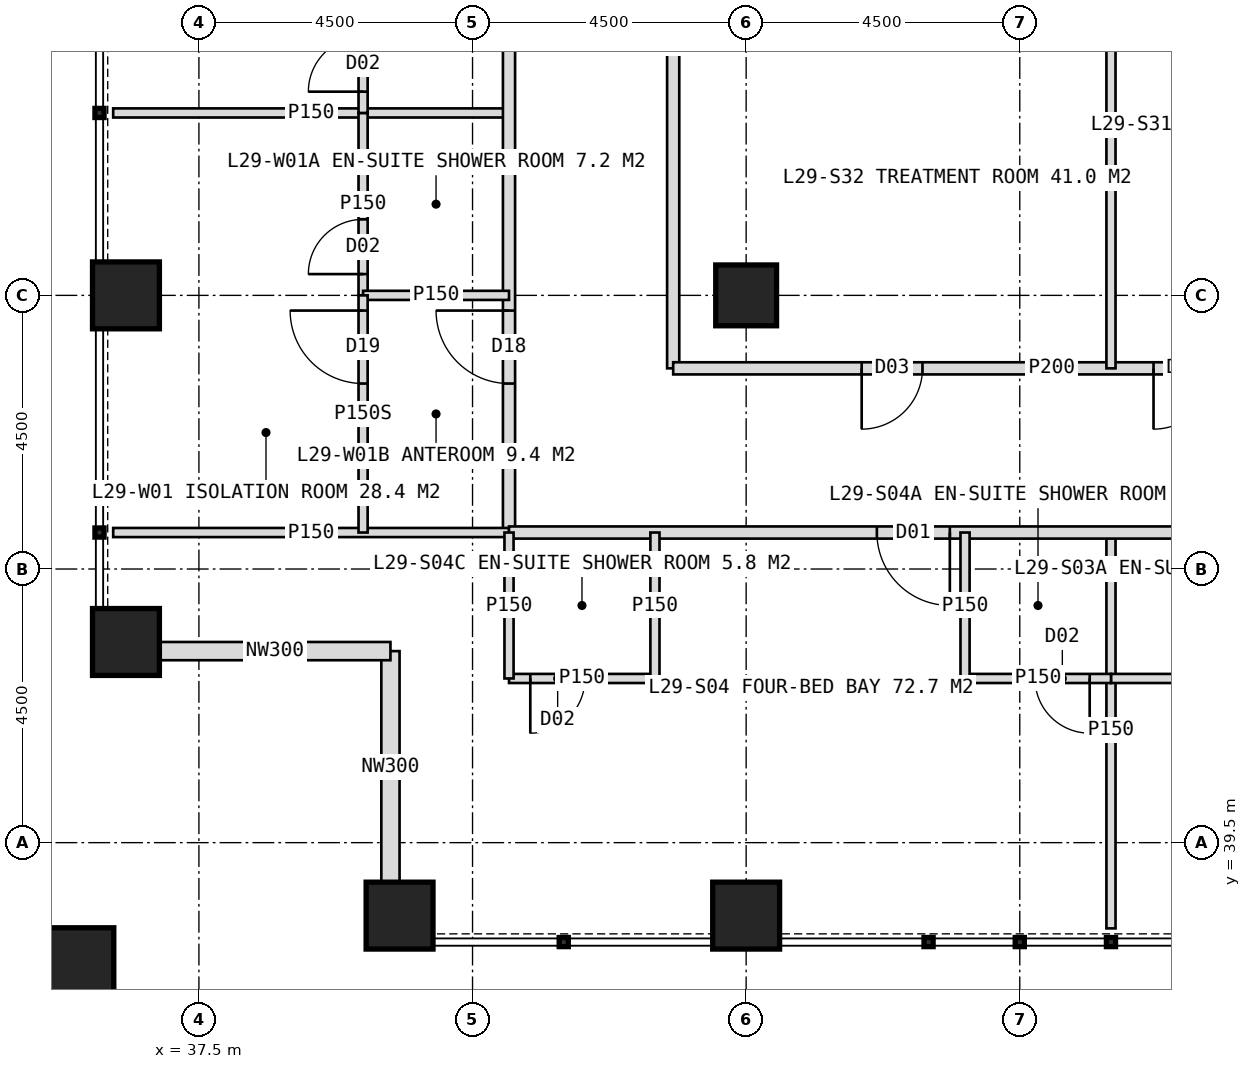
"""IFC4 building model, lengths in metres.
Left out: names, types, materials, properties, quantities, classifications, styles, units other than length and angle.
Written with IfcOpenShell. Run it as: python <this file> out.ifc"""

import sys

from ifc_helpers import new_model, si_unit, direction, frame, frame_2d, origin, origin_2d, place, context, subcontext, project, spatial, rectangle, hollow_rectangle, extrude, element, fill, save


model = new_model("IFC4")
c1 = context("Model", 3, precision=1e-05, world=origin(), true_north=direction((0.0, 1.0)))
c2 = subcontext(c1, "Body", "Model", "MODEL_VIEW")
j1 = project(units=[si_unit("LENGTHUNIT", "METRE"), si_unit("PLANEANGLEUNIT", "RADIAN")], contexts=[c1])
p1 = place(None, origin())
s1 = spatial("IfcSite", under=j1, at=p1, CompositionType="ELEMENT")
p2 = place(p1, origin())
s2 = spatial("IfcBuilding", under=s1, at=p2, CompositionType="ELEMENT")
p3 = place(p2, frame((0.0, 0.0, 124.0)))
s3 = spatial("IfcBuildingStorey", under=s2, at=p3, CompositionType="ELEMENT", Elevation=124.0)
p4 = place(p3, frame((46.5, 48.5, 0.0), z_axis=(0.0, 0.0, 1.0), x_axis=(1.0, 0.0, 0.0)))
e1 = element("IfcColumn", 1, at=p4, inside=s3, PredefinedType="COLUMN", context=c2, shape_type="SweptSolid", body=[
    extrude(hollow_rectangle(XDim=1.0, YDim=1.0, WallThickness=0.1, at=origin_2d()), origin(), (0.0, 0.0, 1.0), 4.0),
])
for number, where, z_axis, x_axis in (
    (2, (40.8, 38.3, 0.0), (0.0, 0.0, 1.0), (1.0, 0.0, 0.0)),
    (3, (36.3, 42.8, 0.0), (0.0, 0.0, 1.0), (1.0, 0.0, 0.0)),
    (4, (46.5, 38.3, 0.0), (0.0, 0.0, 1.0), (1.0, 0.0, 0.0)),
    (5, (36.3, 48.5, 0.0), (0.0, 0.0, 1.0), (1.0, 0.0, 0.0)),
):
    element("IfcColumn", number, at=place(p3, frame(where, z_axis=z_axis, x_axis=x_axis)), inside=s3, PredefinedType="COLUMN", context=c2, shape_type="SweptSolid", body=[
        extrude(hollow_rectangle(XDim=1.1, YDim=1.1, WallThickness=0.1, at=origin_2d()), origin(), (0.0, 0.0, 1.0), 4.0),
    ])
p5 = place(p3, frame((35.4, 37.4, 0.0), z_axis=(0.0, 0.0, 1.0), x_axis=(1.0, 0.0, 0.0)))
e6 = element("IfcColumn", 6, at=p5, inside=s3, PredefinedType="COLUMN", context=c2, shape_type="SweptSolid", body=[
    extrude(hollow_rectangle(XDim=1.4, YDim=1.4, WallThickness=0.08, at=origin_2d()), origin(), (0.0, 0.0, 1.0), 4.0),
])
for number, where, z_axis, x_axis in (
    (7, (40.65, 38.85, 0.0), (0.0, 0.0, 1.0), (0.0, 1.0, 0.0)),
    (8, (40.65, 42.65, 0.0), (0.0, 0.0, 1.0), (-1.0, 0.0, 0.0)),
):
    element("IfcWall", number, at=place(p3, frame(where, z_axis=z_axis, x_axis=x_axis)), inside=s3, PredefinedType="ELEMENTEDWALL", context=c2, shape_type="SweptSolid", body=[
        extrude(rectangle(XDim=3.8, YDim=0.3, at=frame_2d((1.9, 0.0))), origin(), (0.0, 0.0, 1.0), 4.0),
    ])
p6 = place(p3, frame((42.6, 51.5, 0.0), z_axis=(0.0, 0.0, 1.0), x_axis=(-1.0, 0.0, 0.0)))
e9 = element("IfcWall", 9, at=p6, inside=s3, PredefinedType="PARTITIONING", context=c2, shape_type="SweptSolid", body=[
    extrude(rectangle(XDim=6.51, YDim=0.15, at=frame_2d((3.255, 0.0))), origin(), (0.0, 0.0, 1.0), 3.75),
])
p7 = place(p3, frame((42.6, 44.6, 0.0), z_axis=(0.0, 0.0, 1.0), x_axis=(0.0, 1.0, 0.0)))
e10 = element("IfcWall", 10, at=p7, inside=s3, PredefinedType="PARTITIONING", context=c2, shape_type="SweptSolid", body=[
    extrude(rectangle(XDim=34.8, YDim=0.2, at=frame_2d((17.4, 0.0))), origin(), (0.0, 0.0, 1.0), 3.75),
])
p8 = place(p7, frame((2.45, 0.0, 0.0)))
e11 = element("IfcOpeningElement", 11, at=p8, cuts=e10, PredefinedType="OPENING", context=c2, shape_type="SweptSolid", body=[
    extrude(rectangle(XDim=1.2, YDim=2.2, at=frame_2d((0.6, 1.1))), frame((0.0, 0.11, 0.0), z_axis=(0.0, -1.0, 0.0), x_axis=(1.0, 0.0, 0.0)), (0.0, 0.0, 1.0), 0.22),
])
p9 = place(p7, frame((10.15, 0.0, 0.0)))
e12 = element("IfcOpeningElement", 12, at=p9, cuts=e10, PredefinedType="OPENING", context=c2, shape_type="SweptSolid", body=[
    extrude(rectangle(XDim=1.2, YDim=2.2, at=frame_2d((0.6, 1.1))), frame((0.0, 0.11, 0.0), z_axis=(0.0, -1.0, 0.0), x_axis=(1.0, 0.0, 0.0)), (0.0, 0.0, 1.0), 0.22),
])
p10 = place(p7, frame((23.45, 0.0, 0.0)))
e13 = element("IfcOpeningElement", 13, at=p10, cuts=e10, PredefinedType="OPENING", context=c2, shape_type="SweptSolid", body=[
    extrude(rectangle(XDim=1.2, YDim=2.2, at=frame_2d((0.6, 1.1))), frame((0.0, 0.11, 0.0), z_axis=(0.0, -1.0, 0.0), x_axis=(1.0, 0.0, 0.0)), (0.0, 0.0, 1.0), 0.22),
])
p11 = place(p7, frame((30.55, 0.0, 0.0)))
e14 = element("IfcOpeningElement", 14, at=p11, cuts=e10, PredefinedType="OPENING", context=c2, shape_type="SweptSolid", body=[
    extrude(rectangle(XDim=1.2, YDim=2.2, at=frame_2d((0.6, 1.1))), frame((0.0, 0.11, 0.0), z_axis=(0.0, -1.0, 0.0), x_axis=(1.0, 0.0, 0.0)), (0.0, 0.0, 1.0), 0.22),
])
p12 = place(p3, frame((42.6, 44.6, 0.0), z_axis=(0.0, 0.0, 1.0), x_axis=(-1.0, 0.0, 0.0)))
e15 = element("IfcWall", 15, at=p12, inside=s3, PredefinedType="PARTITIONING", context=c2, shape_type="SweptSolid", body=[
    extrude(rectangle(XDim=6.51, YDim=0.15, at=frame_2d((3.255, 0.0))), origin(), (0.0, 0.0, 1.0), 3.75),
])
p13 = place(p3, frame((40.2, 48.5, 0.0), z_axis=(0.0, 0.0, 1.0), x_axis=(0.0, 1.0, 0.0)))
e16 = element("IfcWall", 16, at=p13, inside=s3, PredefinedType="PARTITIONING", context=c2, shape_type="SweptSolid", body=[
    extrude(rectangle(XDim=3.0, YDim=0.15, at=frame_2d((1.5, 0.0))), origin(), (0.0, 0.0, 1.0), 3.75),
])
p14 = place(p13, frame((0.35, 0.0, 0.0)))
e17 = element("IfcOpeningElement", 17, at=p14, cuts=e16, PredefinedType="OPENING", context=c2, shape_type="SweptSolid", body=[
    extrude(rectangle(XDim=0.9, YDim=2.1, at=frame_2d((0.45, 1.05))), frame((0.0, 0.085, 0.0), z_axis=(0.0, -1.0, 0.0), x_axis=(1.0, 0.0, 0.0)), (0.0, 0.0, 1.0), 0.17),
])
p15 = place(p3, frame((42.6, 48.5, 0.0), z_axis=(0.0, 0.0, 1.0), x_axis=(-1.0, 0.0, 0.0)))
e18 = element("IfcWall", 18, at=p15, inside=s3, PredefinedType="PARTITIONING", context=c2, shape_type="SweptSolid", body=[
    extrude(rectangle(XDim=2.4, YDim=0.15, at=frame_2d((1.2, 0.0))), origin(), (0.0, 0.0, 1.0), 2.95),
])
p16 = place(p3, frame((40.2, 44.6, 0.0), z_axis=(0.0, 0.0, 1.0), x_axis=(0.0, 1.0, 0.0)))
e19 = element("IfcWall", 19, at=p16, inside=s3, PredefinedType="PARTITIONING", context=c2, shape_type="SweptSolid", body=[
    extrude(rectangle(XDim=3.9, YDim=0.15, at=frame_2d((1.95, 0.0))), origin(), (0.0, 0.0, 1.0), 3.75),
])
p17 = place(p16, frame((2.45, 0.0, 0.0)))
e20 = element("IfcOpeningElement", 20, at=p17, cuts=e19, PredefinedType="OPENING", context=c2, shape_type="SweptSolid", body=[
    extrude(rectangle(XDim=1.2, YDim=2.2, at=frame_2d((0.6, 1.1))), frame((0.0, 0.085, 0.0), z_axis=(0.0, -1.0, 0.0), x_axis=(1.0, 0.0, 0.0)), (0.0, 0.0, 1.0), 0.17),
])
p18 = place(p3, frame((40.2, 51.5, 0.0), z_axis=(0.0, 0.0, 1.0), x_axis=(0.0, 1.0, 0.0)))
e21 = element("IfcWall", 21, at=p18, inside=s3, PredefinedType="PARTITIONING", context=c2, shape_type="SweptSolid", body=[
    extrude(rectangle(XDim=3.0, YDim=0.15, at=frame_2d((1.5, 0.0))), origin(), (0.0, 0.0, 1.0), 3.75),
])
p19 = place(p18, frame((0.35, 0.0, 0.0)))
e22 = element("IfcOpeningElement", 22, at=p19, cuts=e21, PredefinedType="OPENING", context=c2, shape_type="SweptSolid", body=[
    extrude(rectangle(XDim=0.9, YDim=2.1, at=frame_2d((0.45, 1.05))), frame((0.0, 0.085, 0.0), z_axis=(0.0, -1.0, 0.0), x_axis=(1.0, 0.0, 0.0)), (0.0, 0.0, 1.0), 0.17),
])
p20 = place(p3, frame((45.3, 47.3, 0.0), z_axis=(0.0, 0.0, 1.0), x_axis=(0.0, 1.0, 0.0)))
e23 = element("IfcWall", 23, at=p20, inside=s3, PredefinedType="PARTITIONING", context=c2, shape_type="SweptSolid", body=[
    extrude(rectangle(XDim=10.7, YDim=0.2, at=frame_2d((5.35, 0.0))), origin(), (0.0, 0.0, 1.0), 3.75),
])
p21 = place(p20, frame((6.5, 0.0, 0.0)))
e24 = element("IfcOpeningElement", 24, at=p21, cuts=e23, PredefinedType="OPENING", context=c2, shape_type="SweptSolid", body=[
    extrude(rectangle(XDim=0.9, YDim=2.1, at=frame_2d((0.45, 1.05))), frame((0.0, 0.11, 0.0), z_axis=(0.0, -1.0, 0.0), x_axis=(1.0, 0.0, 0.0)), (0.0, 0.0, 1.0), 0.22),
])
p22 = place(p20, frame((8.45, 0.0, 0.0)))
e25 = element("IfcOpeningElement", 25, at=p22, cuts=e23, PredefinedType="OPENING", context=c2, shape_type="SweptSolid", body=[
    extrude(rectangle(XDim=0.9, YDim=2.1, at=frame_2d((0.45, 1.05))), frame((0.0, 0.11, 0.0), z_axis=(0.0, -1.0, 0.0), x_axis=(1.0, 0.0, 0.0)), (0.0, 0.0, 1.0), 0.22),
])
p23 = place(p3, frame((52.5, 44.6, 0.0), z_axis=(0.0, 0.0, 1.0), x_axis=(0.0, -1.0, 0.0)))
e26 = element("IfcWall", 26, at=p23, inside=s3, PredefinedType="PARTITIONING", context=c2, shape_type="SweptSolid", body=[
    extrude(rectangle(XDim=6.51, YDim=0.15, at=frame_2d((3.255, 0.0))), origin(), (0.0, 0.0, 1.0), 3.75),
])
p24 = place(p3, frame((77.4, 44.6, 0.0), z_axis=(0.0, 0.0, 1.0), x_axis=(-1.0, 0.0, 0.0)))
e27 = element("IfcWall", 27, at=p24, inside=s3, PredefinedType="PARTITIONING", context=c2, shape_type="SweptSolid", body=[
    extrude(rectangle(XDim=34.8, YDim=0.2, at=frame_2d((17.4, 0.0))), origin(), (0.0, 0.0, 1.0), 3.75),
])
p25 = place(p24, frame((2.45, 0.0, 0.0)))
e28 = element("IfcOpeningElement", 28, at=p25, cuts=e27, PredefinedType="OPENING", context=c2, shape_type="SweptSolid", body=[
    extrude(rectangle(XDim=1.2, YDim=2.2, at=frame_2d((0.6, 1.1))), frame((0.0, 0.11, 0.0), z_axis=(0.0, -1.0, 0.0), x_axis=(1.0, 0.0, 0.0)), (0.0, 0.0, 1.0), 0.22),
])
p26 = place(p24, frame((10.15, 0.0, 0.0)))
e29 = element("IfcOpeningElement", 29, at=p26, cuts=e27, PredefinedType="OPENING", context=c2, shape_type="SweptSolid", body=[
    extrude(rectangle(XDim=1.2, YDim=2.2, at=frame_2d((0.6, 1.1))), frame((0.0, 0.11, 0.0), z_axis=(0.0, -1.0, 0.0), x_axis=(1.0, 0.0, 0.0)), (0.0, 0.0, 1.0), 0.22),
])
p27 = place(p24, frame((20.45, 0.0, 0.0)))
e30 = element("IfcOpeningElement", 30, at=p27, cuts=e27, PredefinedType="OPENING", context=c2, shape_type="SweptSolid", body=[
    extrude(rectangle(XDim=1.2, YDim=2.2, at=frame_2d((0.6, 1.1))), frame((0.0, 0.11, 0.0), z_axis=(0.0, -1.0, 0.0), x_axis=(1.0, 0.0, 0.0)), (0.0, 0.0, 1.0), 0.22),
])
p28 = place(p24, frame((27.55, 0.0, 0.0)))
e31 = element("IfcOpeningElement", 31, at=p28, cuts=e27, PredefinedType="OPENING", context=c2, shape_type="SweptSolid", body=[
    extrude(rectangle(XDim=1.2, YDim=2.2, at=frame_2d((0.6, 1.1))), frame((0.0, 0.11, 0.0), z_axis=(0.0, -1.0, 0.0), x_axis=(1.0, 0.0, 0.0)), (0.0, 0.0, 1.0), 0.22),
])
p29 = place(p3, frame((55.5, 42.2, 0.0), z_axis=(0.0, 0.0, 1.0), x_axis=(-1.0, 0.0, 0.0)))
e32 = element("IfcWall", 32, at=p29, inside=s3, PredefinedType="PARTITIONING", context=c2, shape_type="SweptSolid", body=[
    extrude(rectangle(XDim=3.0, YDim=0.15, at=frame_2d((1.5, 0.0))), origin(), (0.0, 0.0, 1.0), 3.75),
])
p30 = place(p29, frame((0.35, 0.0, 0.0)))
e33 = element("IfcOpeningElement", 33, at=p30, cuts=e32, PredefinedType="OPENING", context=c2, shape_type="SweptSolid", body=[
    extrude(rectangle(XDim=0.9, YDim=2.1, at=frame_2d((0.45, 1.05))), frame((0.0, 0.085, 0.0), z_axis=(0.0, -1.0, 0.0), x_axis=(1.0, 0.0, 0.0)), (0.0, 0.0, 1.0), 0.17),
])
p31 = place(p3, frame((52.5, 42.2, 0.0), z_axis=(0.0, 0.0, 1.0), x_axis=(-1.0, 0.0, 0.0)))
e34 = element("IfcWall", 34, at=p31, inside=s3, PredefinedType="PARTITIONING", context=c2, shape_type="SweptSolid", body=[
    extrude(rectangle(XDim=2.4, YDim=0.15, at=frame_2d((1.2, 0.0))), origin(), (0.0, 0.0, 1.0), 3.75),
])
p32 = place(p31, frame((0.35, 0.0, 0.0)))
e35 = element("IfcOpeningElement", 35, at=p32, cuts=e34, PredefinedType="OPENING", context=c2, shape_type="SweptSolid", body=[
    extrude(rectangle(XDim=0.9, YDim=2.1, at=frame_2d((0.45, 1.05))), frame((0.0, 0.085, 0.0), z_axis=(0.0, -1.0, 0.0), x_axis=(1.0, 0.0, 0.0)), (0.0, 0.0, 1.0), 0.17),
])
p33 = place(p3, frame((50.1, 44.6, 0.0), z_axis=(0.0, 0.0, 1.0), x_axis=(0.0, -1.0, 0.0)))
e36 = element("IfcWall", 36, at=p33, inside=s3, PredefinedType="PARTITIONING", context=c2, shape_type="SweptSolid", body=[
    extrude(rectangle(XDim=2.4, YDim=0.15, at=frame_2d((1.2, 0.0))), origin(), (0.0, 0.0, 1.0), 3.75),
])
p34 = place(p3, frame((45.0, 42.2, 0.0), z_axis=(0.0, 0.0, 1.0), x_axis=(-1.0, 0.0, 0.0)))
e37 = element("IfcWall", 37, at=p34, inside=s3, PredefinedType="PARTITIONING", context=c2, shape_type="SweptSolid", body=[
    extrude(rectangle(XDim=2.4, YDim=0.15, at=frame_2d((1.2, 0.0))), origin(), (0.0, 0.0, 1.0), 3.75),
])
p35 = place(p34, frame((1.15, 0.0, 0.0)))
e38 = element("IfcOpeningElement", 38, at=p35, cuts=e37, PredefinedType="OPENING", context=c2, shape_type="SweptSolid", body=[
    extrude(rectangle(XDim=0.9, YDim=2.1, at=frame_2d((0.45, 1.05))), frame((0.0, 0.085, 0.0), z_axis=(0.0, -1.0, 0.0), x_axis=(1.0, 0.0, 0.0)), (0.0, 0.0, 1.0), 0.17),
])
for number, where, z_axis, x_axis in (
    (39, (45.0, 44.6, 0.0), (0.0, 0.0, 1.0), (0.0, -1.0, 0.0)),
    (40, (42.6, 44.6, 0.0), (0.0, 0.0, 1.0), (0.0, -1.0, 0.0)),
):
    element("IfcWall", number, at=place(p3, frame(where, z_axis=z_axis, x_axis=x_axis)), inside=s3, PredefinedType="PARTITIONING", context=c2, shape_type="SweptSolid", body=[
        extrude(rectangle(XDim=2.4, YDim=0.15, at=frame_2d((1.2, 0.0))), origin(), (0.0, 0.0, 1.0), 3.75),
    ])
p36 = place(p3, frame((57.75, 47.3, 0.0), z_axis=(0.0, 0.0, 1.0), x_axis=(-1.0, 0.0, 0.0)))
e41 = element("IfcWall", 41, at=p36, inside=s3, PredefinedType="PARTITIONING", context=c2, shape_type="SweptSolid", body=[
    extrude(rectangle(XDim=12.45, YDim=0.2, at=frame_2d((6.225, 0.0))), origin(), (0.0, 0.0, 1.0), 3.75),
])
p37 = place(p36, frame((3.55, 0.0, 0.0)))
e42 = element("IfcOpeningElement", 42, at=p37, cuts=e41, PredefinedType="OPENING", context=c2, shape_type="SweptSolid", body=[
    extrude(rectangle(XDim=1.0, YDim=2.1, at=frame_2d((0.5, 1.05))), frame((0.0, 0.11, 0.0), z_axis=(0.0, -1.0, 0.0), x_axis=(1.0, 0.0, 0.0)), (0.0, 0.0, 1.0), 0.22),
])
p38 = place(p36, frame((8.35, 0.0, 0.0)))
e43 = element("IfcOpeningElement", 43, at=p38, cuts=e41, PredefinedType="OPENING", context=c2, shape_type="SweptSolid", body=[
    extrude(rectangle(XDim=1.0, YDim=2.1, at=frame_2d((0.5, 1.05))), frame((0.0, 0.11, 0.0), z_axis=(0.0, -1.0, 0.0), x_axis=(1.0, 0.0, 0.0)), (0.0, 0.0, 1.0), 0.22),
])
p39 = place(p3, frame((52.5, 53.0, 0.0), z_axis=(0.0, 0.0, 1.0), x_axis=(0.0, -1.0, 0.0)))
e44 = element("IfcWall", 44, at=p39, inside=s3, PredefinedType="PARTITIONING", context=c2, shape_type="SweptSolid", body=[
    extrude(rectangle(XDim=5.7, YDim=0.15, at=frame_2d((2.85, 0.0))), origin(), (0.0, 0.0, 1.0), 3.75),
])
p40 = place(p17, origin())
e45 = element("IfcDoor", 45, at=p40, inside=s3, OperationType="SINGLE_SWING_RIGHT", PredefinedType="DOOR", context=c2, shape_type="SweptSolid", body=[
    extrude(rectangle(XDim=1.2, YDim=2.2, at=frame_2d((0.6, 1.1))), frame((0.0, 0.025, 0.0), z_axis=(0.0, -1.0, 0.0), x_axis=(1.0, 0.0, 0.0)), (0.0, 0.0, 1.0), 0.05),
])
fill(e20, e45)
p41 = place(p8, origin())
e46 = element("IfcDoor", 46, at=p41, inside=s3, OperationType="SINGLE_SWING_RIGHT", PredefinedType="DOOR", context=c2, shape_type="SweptSolid", body=[
    extrude(rectangle(XDim=1.2, YDim=2.2, at=frame_2d((0.6, 1.1))), frame((0.0, 0.025, 0.0), z_axis=(0.0, -1.0, 0.0), x_axis=(1.0, 0.0, 0.0)), (0.0, 0.0, 1.0), 0.05),
])
fill(e11, e46)
p42 = place(p14, origin())
e47 = element("IfcDoor", 47, at=p42, inside=s3, OperationType="SINGLE_SWING_LEFT", PredefinedType="DOOR", context=c2, shape_type="SweptSolid", body=[
    extrude(rectangle(XDim=0.9, YDim=2.1, at=frame_2d((0.45, 1.05))), frame((0.0, 0.025, 0.0), z_axis=(0.0, -1.0, 0.0), x_axis=(1.0, 0.0, 0.0)), (0.0, 0.0, 1.0), 0.05),
])
fill(e17, e47)
p43 = place(p19, origin())
e48 = element("IfcDoor", 48, at=p43, inside=s3, OperationType="SINGLE_SWING_LEFT", PredefinedType="DOOR", context=c2, shape_type="SweptSolid", body=[
    extrude(rectangle(XDim=0.9, YDim=2.1, at=frame_2d((0.45, 1.05))), frame((0.0, 0.025, 0.0), z_axis=(0.0, -1.0, 0.0), x_axis=(1.0, 0.0, 0.0)), (0.0, 0.0, 1.0), 0.05),
])
fill(e22, e48)
p44 = place(p28, origin())
e49 = element("IfcDoor", 49, at=p44, inside=s3, OperationType="SINGLE_SWING_LEFT", PredefinedType="DOOR", context=c2, shape_type="SweptSolid", body=[
    extrude(rectangle(XDim=1.2, YDim=2.2, at=frame_2d((0.6, 1.1))), frame((0.0, 0.025, 0.0), z_axis=(0.0, -1.0, 0.0), x_axis=(1.0, 0.0, 0.0)), (0.0, 0.0, 1.0), 0.05),
])
fill(e31, e49)
p45 = place(p32, origin())
e50 = element("IfcDoor", 50, at=p45, inside=s3, OperationType="SINGLE_SWING_LEFT", PredefinedType="DOOR", context=c2, shape_type="SweptSolid", body=[
    extrude(rectangle(XDim=0.9, YDim=2.1, at=frame_2d((0.45, 1.05))), frame((0.0, 0.025, 0.0), z_axis=(0.0, -1.0, 0.0), x_axis=(1.0, 0.0, 0.0)), (0.0, 0.0, 1.0), 0.05),
])
fill(e35, e50)
p46 = place(p35, origin())
e51 = element("IfcDoor", 51, at=p46, inside=s3, OperationType="SINGLE_SWING_RIGHT", PredefinedType="DOOR", context=c2, shape_type="SweptSolid", body=[
    extrude(rectangle(XDim=0.9, YDim=2.1, at=frame_2d((0.45, 1.05))), frame((0.0, 0.025, 0.0), z_axis=(0.0, -1.0, 0.0), x_axis=(1.0, 0.0, 0.0)), (0.0, 0.0, 1.0), 0.05),
])
fill(e38, e51)
p47 = place(p37, origin())
e52 = element("IfcDoor", 52, at=p47, inside=s3, OperationType="SINGLE_SWING_RIGHT", PredefinedType="DOOR", context=c2, shape_type="SweptSolid", body=[
    extrude(rectangle(XDim=1.0, YDim=2.1, at=frame_2d((0.5, 1.05))), frame((0.0, 0.025, 0.0), z_axis=(0.0, -1.0, 0.0), x_axis=(1.0, 0.0, 0.0)), (0.0, 0.0, 1.0), 0.05),
])
fill(e42, e52)
p48 = place(p38, origin())
e53 = element("IfcDoor", 53, at=p48, inside=s3, OperationType="SINGLE_SWING_RIGHT", PredefinedType="DOOR", context=c2, shape_type="SweptSolid", body=[
    extrude(rectangle(XDim=1.0, YDim=2.1, at=frame_2d((0.5, 1.05))), frame((0.0, 0.025, 0.0), z_axis=(0.0, -1.0, 0.0), x_axis=(1.0, 0.0, 0.0)), (0.0, 0.0, 1.0), 0.05),
])
fill(e43, e53)
save(model, sys.argv[1])
